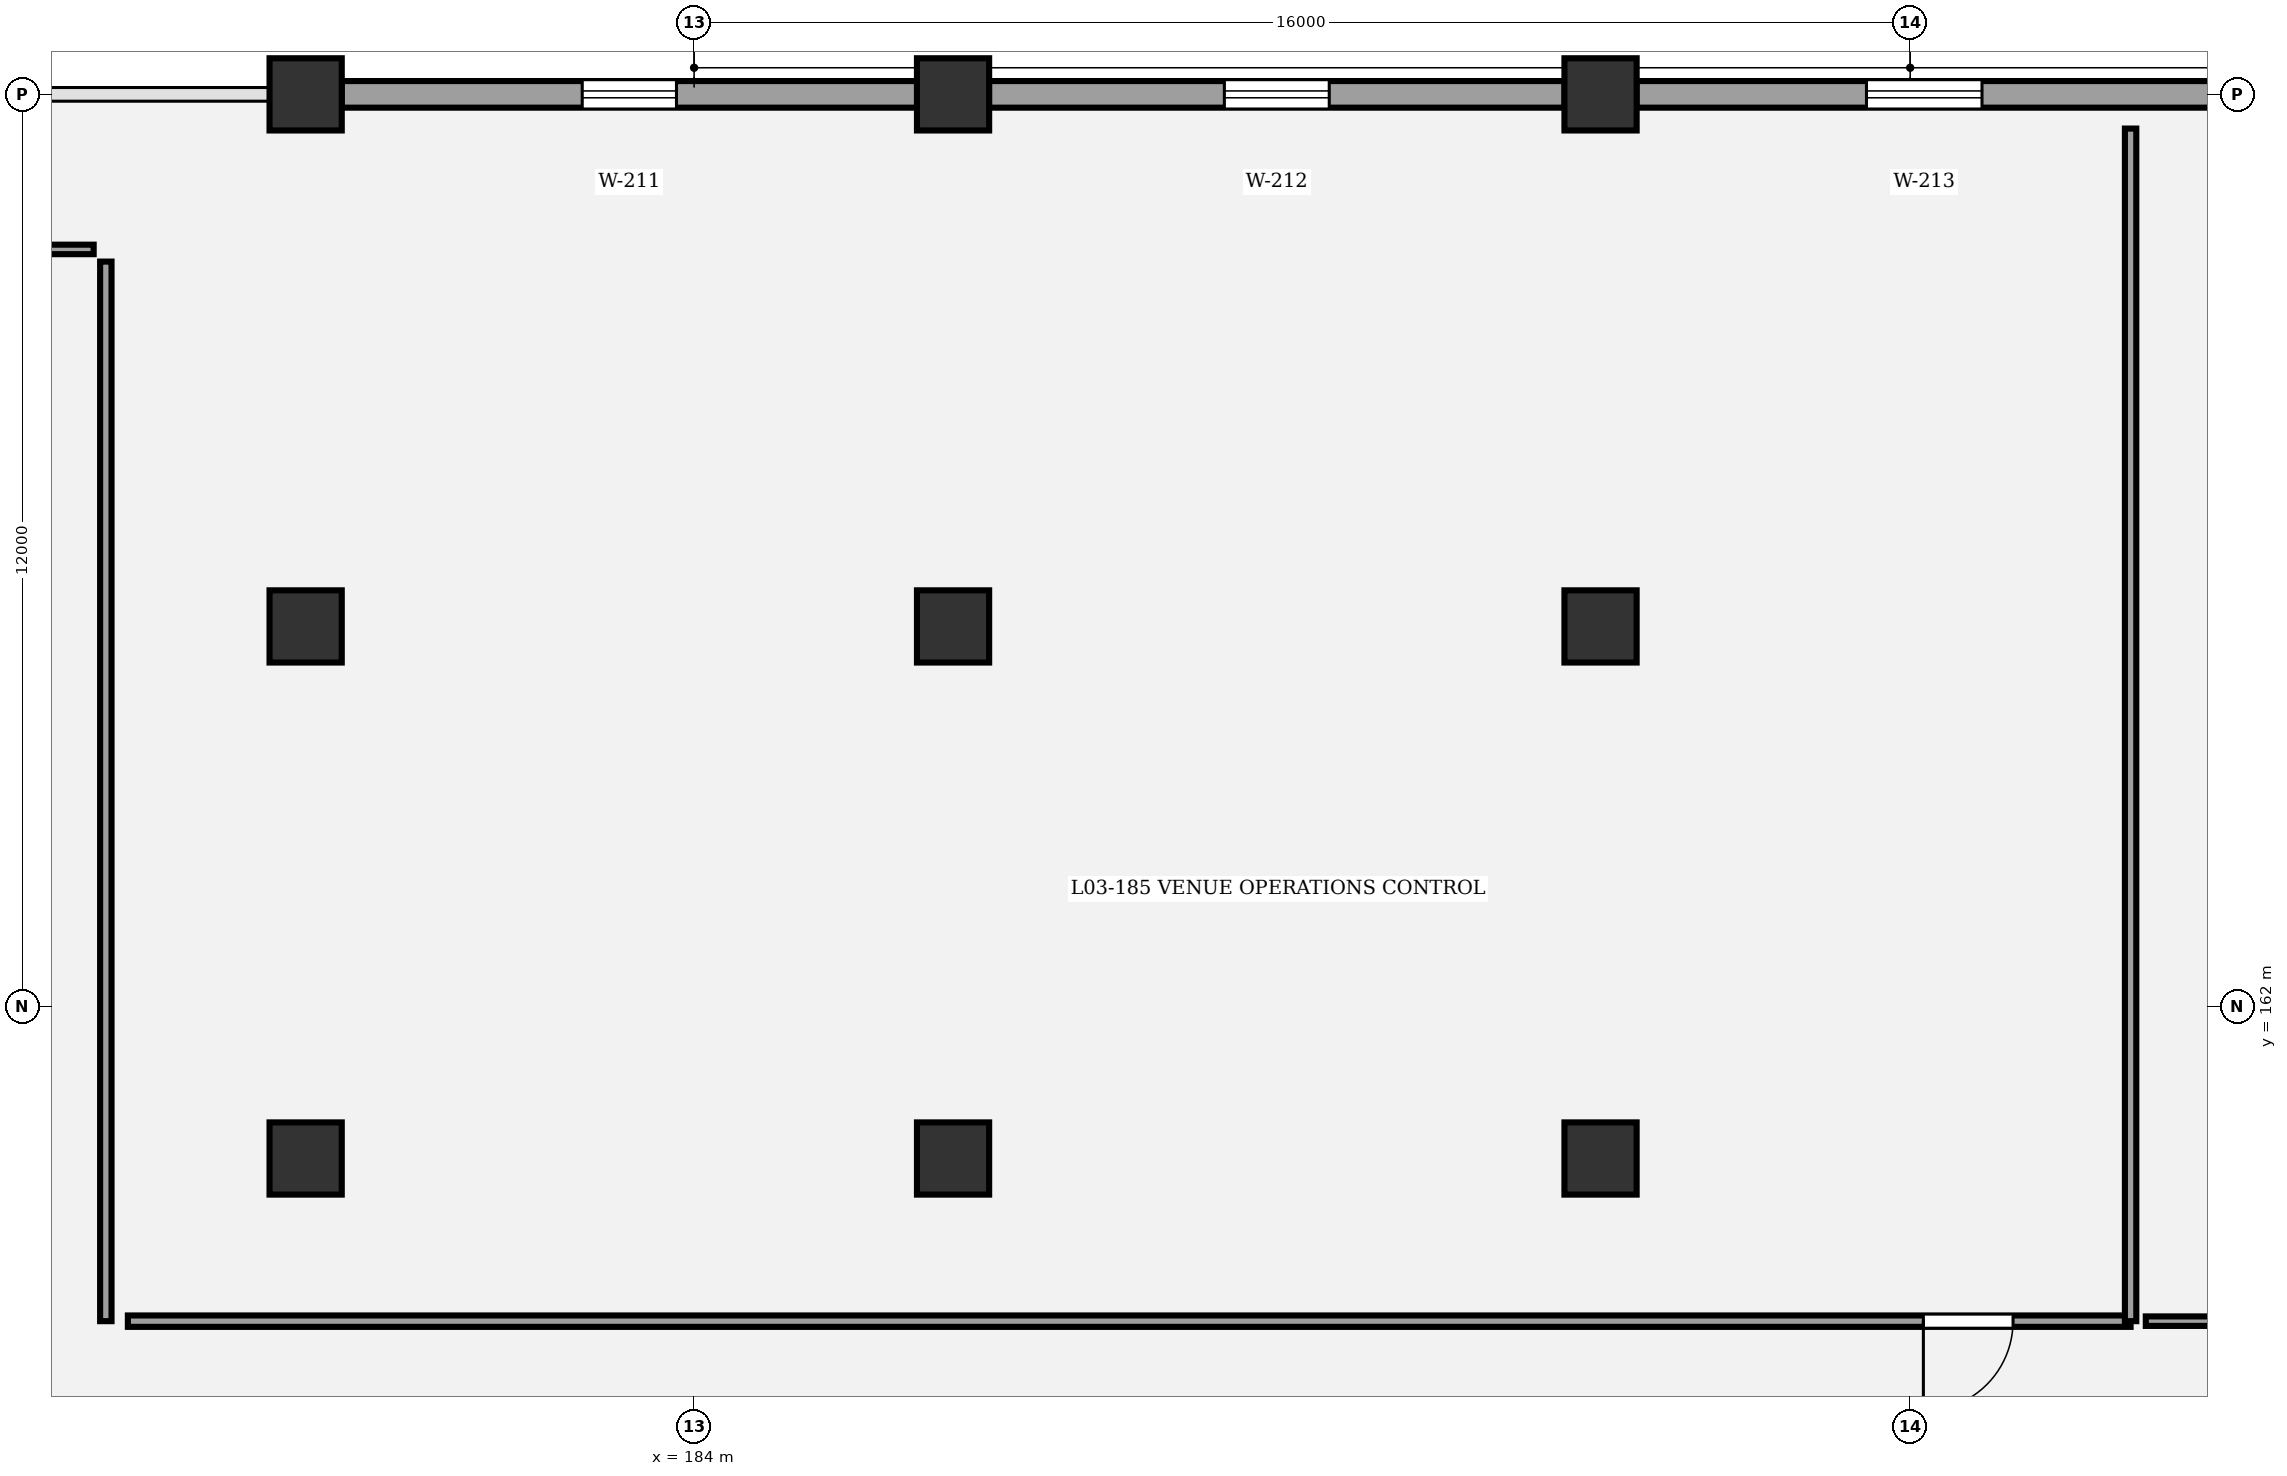
"""IFC4 building model, lengths in metres.
Left out: names, types, materials, properties, quantities, classifications, styles, units other than length and angle.
Written with IfcOpenShell. Run it as: python <this file> out.ifc"""

import sys

from ifc_helpers import new_model, si_unit, direction, frame, frame_2d, origin, origin_2d, place, context, subcontext, project, spatial, rectangle, circle, extrude, element, fill, save


model = new_model("IFC4")
c1 = context("Model", 3, precision=1e-05, world=origin(), true_north=direction((0.0, 1.0)))
c2 = subcontext(c1, "Body", "Model", "MODEL_VIEW")
j1 = project(units=[si_unit("LENGTHUNIT", "METRE"), si_unit("PLANEANGLEUNIT", "RADIAN")], contexts=[c1])
p1 = place(None, origin())
s1 = spatial("IfcSite", under=j1, at=p1, CompositionType="ELEMENT")
p2 = place(p1, origin())
s2 = spatial("IfcBuilding", under=s1, at=p2, CompositionType="ELEMENT")
p3 = place(p2, frame((0.0, 0.0, 14.7)))
s3 = spatial("IfcBuildingStorey", under=s2, at=p3, CompositionType="ELEMENT", Elevation=14.7)
for number, where, z_axis, x_axis in (
    (1, (178.889, 160.0, 0.0), (0.0, 0.0, 1.0), (1.0, 0.0, 0.0)),
    (2, (178.889, 167.0, 0.0), (0.0, 0.0, 1.0), (1.0, 0.0, 0.0)),
    (3, (178.889, 174.0, 0.0), (0.0, 0.0, 1.0), (1.0, 0.0, 0.0)),
    (4, (187.407, 160.0, 0.0), (0.0, 0.0, 1.0), (1.0, 0.0, 0.0)),
    (5, (187.407, 167.0, 0.0), (0.0, 0.0, 1.0), (1.0, 0.0, 0.0)),
    (6, (187.407, 174.0, 0.0), (0.0, 0.0, 1.0), (1.0, 0.0, 0.0)),
    (7, (195.926, 160.0, 0.0), (0.0, 0.0, 1.0), (1.0, 0.0, 0.0)),
    (8, (195.926, 167.0, 0.0), (0.0, 0.0, 1.0), (1.0, 0.0, 0.0)),
    (9, (195.926, 174.0, 0.0), (0.0, 0.0, 1.0), (1.0, 0.0, 0.0)),
):
    element("IfcColumn", number, at=place(p3, frame(where, z_axis=z_axis, x_axis=x_axis)), inside=s3, PredefinedType="COLUMN", context=c2, shape_type="SweptSolid", body=[
        extrude(circle(Radius=0.475, at=origin_2d()), origin(), (0.0, 0.0, 1.0), 4.5),
    ])
p4 = place(p3, frame((179.362, 174.0, 0.0), z_axis=(0.0, 0.0, 1.0), x_axis=(1.0, 0.0, 0.0)))
e10 = element("IfcWall", 10, at=p4, inside=s3, PredefinedType="STANDARD", context=c2, shape_type="SweptSolid", body=[
    extrude(rectangle(XDim=7.572, YDim=0.35, at=frame_2d((3.786, 0.0))), origin(), (0.0, 0.0, 1.0), 3.26),
])
p5 = place(p4, frame((3.166, 0.0, 0.9)))
e11 = element("IfcOpeningElement", 11, at=p5, cuts=e10, PredefinedType="OPENING", context=c2, shape_type="SweptSolid", body=[
    extrude(rectangle(XDim=1.24, YDim=2.15, at=frame_2d((0.62, 1.075))), frame((0.0, 0.185, 0.0), z_axis=(0.0, -1.0, 0.0), x_axis=(1.0, 0.0, 0.0)), (0.0, 0.0, 1.0), 0.37),
])
p6 = place(p3, frame((187.88, 174.0, 0.0), z_axis=(0.0, 0.0, 1.0), x_axis=(1.0, 0.0, 0.0)))
e12 = element("IfcWall", 12, at=p6, inside=s3, PredefinedType="STANDARD", context=c2, shape_type="SweptSolid", body=[
    extrude(rectangle(XDim=7.573, YDim=0.35, at=frame_2d((3.787, 0.0))), origin(), (0.0, 0.0, 1.0), 3.26),
])
p7 = place(p6, frame((3.096, 0.0, 0.9)))
e13 = element("IfcOpeningElement", 13, at=p7, cuts=e12, PredefinedType="OPENING", context=c2, shape_type="SweptSolid", body=[
    extrude(rectangle(XDim=1.38, YDim=2.15, at=frame_2d((0.69, 1.075))), frame((0.0, 0.185, 0.0), z_axis=(0.0, -1.0, 0.0), x_axis=(1.0, 0.0, 0.0)), (0.0, 0.0, 1.0), 0.37),
])
p8 = place(p3, frame((196.399, 174.0, 0.0), z_axis=(0.0, 0.0, 1.0), x_axis=(1.0, 0.0, 0.0)))
e14 = element("IfcWall", 14, at=p8, inside=s3, PredefinedType="STANDARD", context=c2, shape_type="SweptSolid", body=[
    extrude(rectangle(XDim=7.572, YDim=0.35, at=frame_2d((3.786, 0.0))), origin(), (0.0, 0.0, 1.0), 3.26),
])
p9 = place(p8, frame((3.026, 0.0, 0.9)))
e15 = element("IfcOpeningElement", 15, at=p9, cuts=e14, PredefinedType="OPENING", context=c2, shape_type="SweptSolid", body=[
    extrude(rectangle(XDim=1.52, YDim=2.15, at=frame_2d((0.76, 1.075))), frame((0.0, 0.185, 0.0), z_axis=(0.0, -1.0, 0.0), x_axis=(1.0, 0.0, 0.0)), (0.0, 0.0, 1.0), 0.37),
])
p10 = place(p3, frame((176.1, 171.96, 0.0), z_axis=(0.0, 0.0, 1.0), x_axis=(-1.0, 0.0, 0.0)))
e16 = element("IfcWall", 16, at=p10, inside=s3, PredefinedType="PARTITIONING", context=c2, shape_type="SweptSolid", body=[
    extrude(rectangle(XDim=26.1, YDim=0.125, at=frame_2d((13.05, 0.0))), origin(), (0.0, 0.0, 1.0), 3.25),
])
p11 = place(p10, frame((8.846, 0.0, 0.0)))
e17 = element("IfcOpeningElement", 17, at=p11, cuts=e16, PredefinedType="OPENING", context=c2, shape_type="SweptSolid", body=[
    extrude(rectangle(XDim=1.1, YDim=2.1, at=frame_2d((0.55, 1.05))), frame((0.0, 0.073, 0.0), z_axis=(0.0, -1.0, 0.0), x_axis=(1.0, 0.0, 0.0)), (0.0, 0.0, 1.0), 0.145),
])
p12 = place(p3, frame((202.9, 157.86, 0.0), z_axis=(0.0, 0.0, 1.0), x_axis=(-1.0, 0.0, 0.0)))
e18 = element("IfcWall", 18, at=p12, inside=s3, PredefinedType="PARTITIONING", context=c2, shape_type="SweptSolid", body=[
    extrude(rectangle(XDim=26.35, YDim=0.15, at=frame_2d((13.175, 0.0))), origin(), (0.0, 0.0, 1.0), 3.25),
])
p13 = place(p12, frame((1.546, 0.0, 0.0)))
e19 = element("IfcOpeningElement", 19, at=p13, cuts=e18, PredefinedType="OPENING", context=c2, shape_type="SweptSolid", body=[
    extrude(rectangle(XDim=1.18, YDim=2.1, at=frame_2d((0.59, 1.05))), frame((0.0, 0.085, 0.0), z_axis=(0.0, -1.0, 0.0), x_axis=(1.0, 0.0, 0.0)), (0.0, 0.0, 1.0), 0.17),
])
p14 = place(p3, frame((216.5, 157.86, 0.0), z_axis=(0.0, 0.0, 1.0), x_axis=(-1.0, 0.0, 0.0)))
e20 = element("IfcWall", 20, at=p14, inside=s3, PredefinedType="PARTITIONING", context=c2, shape_type="SweptSolid", body=[
    extrude(rectangle(XDim=13.4, YDim=0.125, at=frame_2d((6.7, 0.0))), origin(), (0.0, 0.0, 1.0), 3.25),
])
p15 = place(p14, frame((7.821, 0.0, 0.0)))
e21 = element("IfcOpeningElement", 21, at=p15, cuts=e20, PredefinedType="OPENING", context=c2, shape_type="SweptSolid", body=[
    extrude(rectangle(XDim=1.22, YDim=2.1, at=frame_2d((0.61, 1.05))), frame((0.0, 0.073, 0.0), z_axis=(0.0, -1.0, 0.0), x_axis=(1.0, 0.0, 0.0)), (0.0, 0.0, 1.0), 0.145),
])
p16 = place(p3, frame((176.26, 157.86, 0.0), z_axis=(0.0, 0.0, 1.0), x_axis=(0.0, 1.0, 0.0)))
e22 = element("IfcWall", 22, at=p16, inside=s3, PredefinedType="PARTITIONING", context=c2, shape_type="SweptSolid", body=[
    extrude(rectangle(XDim=13.94, YDim=0.15, at=frame_2d((6.97, 0.0))), origin(), (0.0, 0.0, 1.0), 3.25),
])
p17 = place(p3, frame((202.9, 173.55, 0.0), z_axis=(0.0, 0.0, 1.0), x_axis=(0.0, -1.0, 0.0)))
e23 = element("IfcWall", 23, at=p17, inside=s3, PredefinedType="PARTITIONING", context=c2, shape_type="SweptSolid", body=[
    extrude(rectangle(XDim=15.69, YDim=0.15, at=frame_2d((7.845, 0.0))), origin(), (0.0, 0.0, 1.0), 3.25),
])
p18 = place(p5, origin())
e24 = element("IfcWindow", 24, at=p18, inside=s3, PartitioningType="SINGLE_PANEL", PredefinedType="WINDOW", context=c2, shape_type="SweptSolid", body=[
    extrude(rectangle(XDim=1.24, YDim=2.15, at=frame_2d((0.62, 1.075))), frame((0.0, 0.03, 0.0), z_axis=(0.0, -1.0, 0.0), x_axis=(1.0, 0.0, 0.0)), (0.0, 0.0, 1.0), 0.06),
])
fill(e11, e24)
p19 = place(p7, origin())
e25 = element("IfcWindow", 25, at=p19, inside=s3, PartitioningType="SINGLE_PANEL", PredefinedType="WINDOW", context=c2, shape_type="SweptSolid", body=[
    extrude(rectangle(XDim=1.38, YDim=2.15, at=frame_2d((0.69, 1.075))), frame((0.0, 0.03, 0.0), z_axis=(0.0, -1.0, 0.0), x_axis=(1.0, 0.0, 0.0)), (0.0, 0.0, 1.0), 0.06),
])
fill(e13, e25)
p20 = place(p9, origin())
e26 = element("IfcWindow", 26, at=p20, inside=s3, PartitioningType="SINGLE_PANEL", PredefinedType="WINDOW", context=c2, shape_type="SweptSolid", body=[
    extrude(rectangle(XDim=1.52, YDim=2.15, at=frame_2d((0.76, 1.075))), frame((0.0, 0.03, 0.0), z_axis=(0.0, -1.0, 0.0), x_axis=(1.0, 0.0, 0.0)), (0.0, 0.0, 1.0), 0.06),
])
fill(e15, e26)
p21 = place(p13, origin())
e27 = element("IfcDoor", 27, at=p21, inside=s3, OperationType="SINGLE_SWING_RIGHT", PredefinedType="DOOR", context=c2, shape_type="SweptSolid", body=[
    extrude(rectangle(XDim=1.18, YDim=2.1, at=frame_2d((0.59, 1.05))), frame((0.0, 0.025, 0.0), z_axis=(0.0, -1.0, 0.0), x_axis=(1.0, 0.0, 0.0)), (0.0, 0.0, 1.0), 0.05),
])
fill(e19, e27)
save(model, sys.argv[1])
